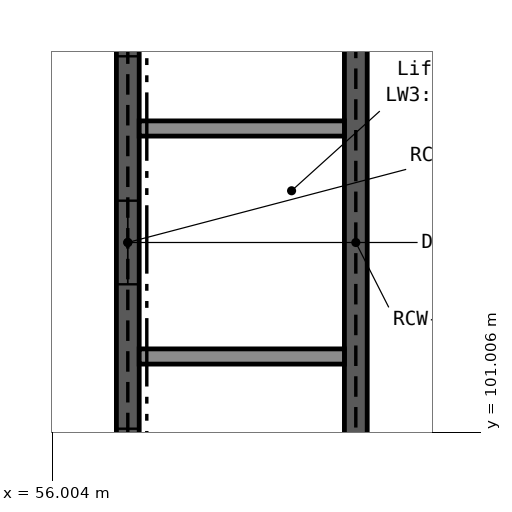
"""IFC4 building model, lengths in metres.
Left out: names, types, materials, properties, quantities, classifications, styles, units other than length and angle.
Written with IfcOpenShell. Run it as: python <this file> out.ifc"""

import sys

from ifc_helpers import new_model, si_unit, direction, frame, frame_2d, origin, place, context, subcontext, project, spatial, rectangle, extrude, element, fill, save


model = new_model("IFC4")
c1 = context("Model", 3, precision=1e-05, world=origin(), true_north=direction((0.0, 1.0)))
c2 = subcontext(c1, "Body", "Model", "MODEL_VIEW")
j1 = project(units=[si_unit("LENGTHUNIT", "METRE"), si_unit("PLANEANGLEUNIT", "RADIAN")], contexts=[c1])
p1 = place(None, origin())
s1 = spatial("IfcSite", under=j1, at=p1, CompositionType="ELEMENT")
p2 = place(p1, origin())
s2 = spatial("IfcBuilding", under=s1, at=p2, CompositionType="ELEMENT")
p3 = place(p2, frame((0.0, 0.0, 16.2)))
s3 = spatial("IfcBuildingStorey", under=s2, at=p3, CompositionType="ELEMENT", Elevation=16.2)
p4 = place(p3, frame((57.0, 99.15, 0.0), z_axis=(0.0, 0.0, 1.0), x_axis=(0.0, 1.0, 0.0)))
e1 = element("IfcWall", 1, at=p4, inside=s3, PredefinedType="SHEAR", context=c2, shape_type="SweptSolid", body=[
    extrude(rectangle(XDim=8.7, YDim=0.3, at=frame_2d((4.35, 0.0))), origin(), (0.0, 0.0, 1.0), 5.4),
])
p5 = place(p4, frame((0.8, 0.0, 0.0)))
e2 = element("IfcOpeningElement", 2, at=p5, cuts=e1, PredefinedType="OPENING", context=c2, shape_type="SweptSolid", body=[
    extrude(rectangle(XDim=1.1, YDim=2.1, at=frame_2d((0.55, 1.05))), frame((0.0, 0.161, 0.0), z_axis=(0.0, -1.0, 0.0), x_axis=(1.0, 0.0, 0.0)), (0.0, 0.0, 1.0), 0.322),
])
p6 = place(p4, frame((3.8, 0.0, 0.0)))
e3 = element("IfcOpeningElement", 3, at=p6, cuts=e1, PredefinedType="OPENING", context=c2, shape_type="SweptSolid", body=[
    extrude(rectangle(XDim=1.1, YDim=2.1, at=frame_2d((0.55, 1.05))), frame((0.0, 0.161, 0.0), z_axis=(0.0, -1.0, 0.0), x_axis=(1.0, 0.0, 0.0)), (0.0, 0.0, 1.0), 0.322),
])
p7 = place(p4, frame((6.8, 0.0, 0.0)))
e4 = element("IfcOpeningElement", 4, at=p7, cuts=e1, PredefinedType="OPENING", context=c2, shape_type="SweptSolid", body=[
    extrude(rectangle(XDim=1.1, YDim=2.1, at=frame_2d((0.55, 1.05))), frame((0.0, 0.161, 0.0), z_axis=(0.0, -1.0, 0.0), x_axis=(1.0, 0.0, 0.0)), (0.0, 0.0, 1.0), 0.322),
])
p8 = place(p3, frame((60.0, 99.15, 0.0), z_axis=(0.0, 0.0, 1.0), x_axis=(0.0, 1.0, 0.0)))
e5 = element("IfcWall", 5, at=p8, inside=s3, PredefinedType="SHEAR", context=c2, shape_type="SweptSolid", body=[
    extrude(rectangle(XDim=8.7, YDim=0.3, at=frame_2d((4.35, 0.0))), origin(), (0.0, 0.0, 1.0), 5.4),
])
for number, where, z_axis, x_axis in (
    (6, (57.15, 102.0, 0.0), (0.0, 0.0, 1.0), (1.0, 0.0, 0.0)),
    (7, (57.15, 105.0, 0.0), (0.0, 0.0, 1.0), (1.0, 0.0, 0.0)),
):
    element("IfcWall", number, at=place(p3, frame(where, z_axis=z_axis, x_axis=x_axis)), inside=s3, PredefinedType="SOLIDWALL", context=c2, shape_type="SweptSolid", body=[
        extrude(rectangle(XDim=2.7, YDim=0.2, at=frame_2d((1.35, 0.0))), origin(), (0.0, 0.0, 1.0), 5.4),
    ])
p9 = place(p5, origin())
e8 = element("IfcDoor", 8, at=p9, inside=s3, OperationType="DOUBLE_DOOR_SLIDING", PredefinedType="DOOR", context=c2, shape_type="SweptSolid", body=[
    extrude(rectangle(XDim=1.1, YDim=2.1, at=frame_2d((0.55, 1.05))), frame((0.0, 0.025, 0.0), z_axis=(0.0, -1.0, 0.0), x_axis=(1.0, 0.0, 0.0)), (0.0, 0.0, 1.0), 0.05),
])
fill(e2, e8)
p10 = place(p6, origin())
e9 = element("IfcDoor", 9, at=p10, inside=s3, OperationType="DOUBLE_DOOR_SLIDING", PredefinedType="DOOR", context=c2, shape_type="SweptSolid", body=[
    extrude(rectangle(XDim=1.1, YDim=2.1, at=frame_2d((0.55, 1.05))), frame((0.0, 0.025, 0.0), z_axis=(0.0, -1.0, 0.0), x_axis=(1.0, 0.0, 0.0)), (0.0, 0.0, 1.0), 0.05),
])
fill(e3, e9)
p11 = place(p7, origin())
e10 = element("IfcDoor", 10, at=p11, inside=s3, OperationType="DOUBLE_DOOR_SLIDING", PredefinedType="DOOR", context=c2, shape_type="SweptSolid", body=[
    extrude(rectangle(XDim=1.1, YDim=2.1, at=frame_2d((0.55, 1.05))), frame((0.0, 0.025, 0.0), z_axis=(0.0, -1.0, 0.0), x_axis=(1.0, 0.0, 0.0)), (0.0, 0.0, 1.0), 0.05),
])
fill(e4, e10)
save(model, sys.argv[1])
